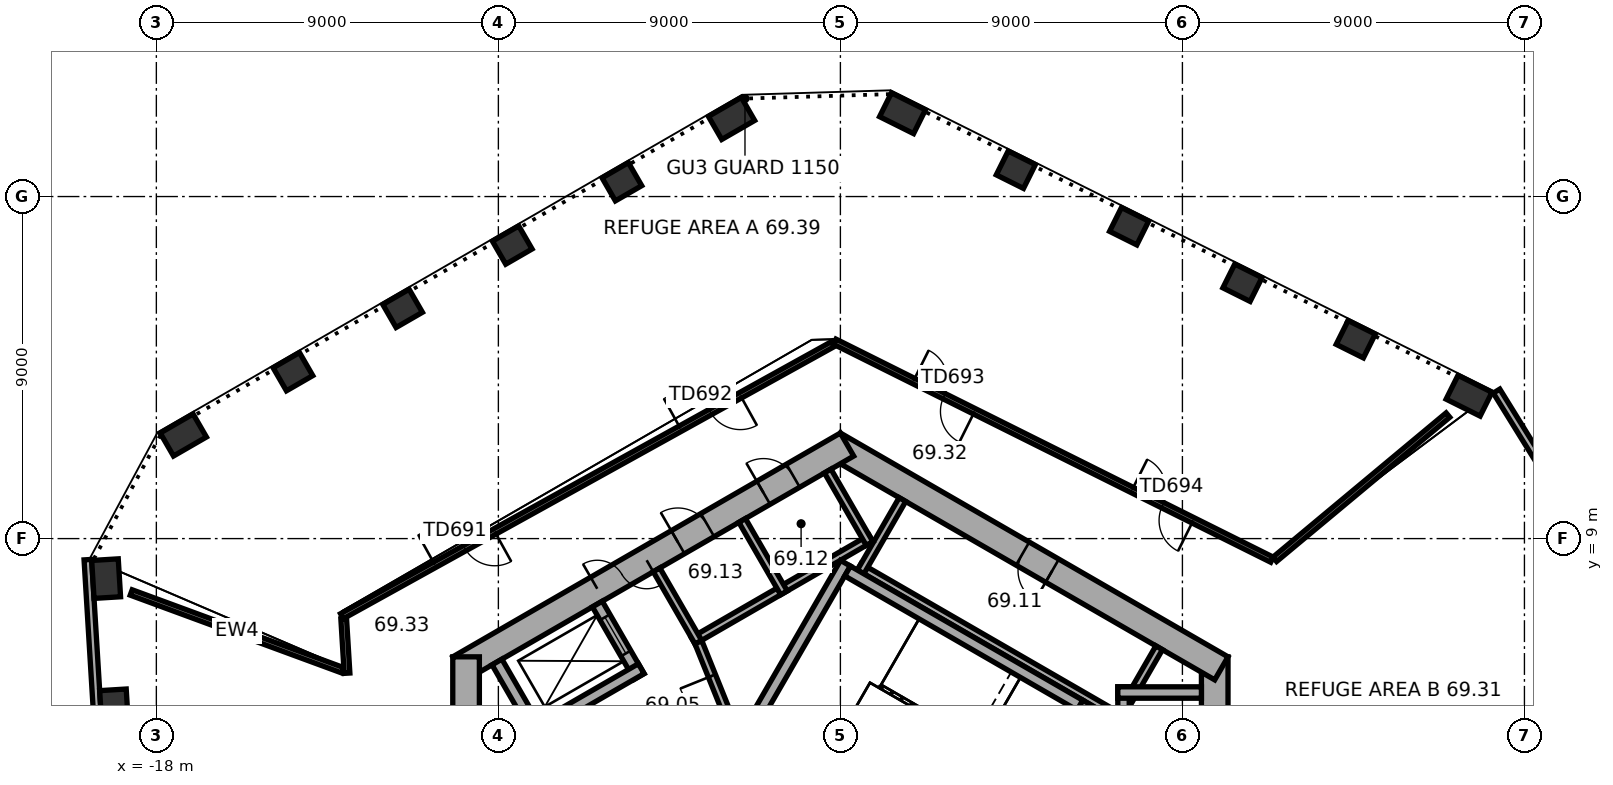
"""IFC4 building model, lengths in metres.
Left out: names, types, materials, properties, quantities, classifications, styles, units other than length and angle.
Written with IfcOpenShell. Run it as: python <this file> out.ifc"""

import sys

from ifc_helpers import new_model, si_unit, direction, frame, frame_2d, origin, origin_2d, place, context, subcontext, project, spatial, rectangle, extrude, element, fill, save


model = new_model("IFC4")
c1 = context("Model", 3, precision=1e-05, world=origin(), true_north=direction((0.0, 1.0)))
c2 = subcontext(c1, "Body", "Model", "MODEL_VIEW")
j1 = project(units=[si_unit("LENGTHUNIT", "METRE"), si_unit("PLANEANGLEUNIT", "RADIAN")], contexts=[c1])
p1 = place(None, origin())
s1 = spatial("IfcSite", under=j1, at=p1, CompositionType="ELEMENT")
p2 = place(p1, origin())
s2 = spatial("IfcBuilding", under=s1, at=p2, CompositionType="ELEMENT")
p3 = place(p2, frame((0.0, 0.0, 278.3)))
s3 = spatial("IfcBuildingStorey", under=s2, at=p3, CompositionType="ELEMENT", Elevation=278.3)
p4 = place(p3, frame((16.543, 12.759, 0.0), z_axis=(0.0, 0.0, 1.0), x_axis=(-0.894934361602, 0.44619781311, 0.0)))
e1 = element("IfcColumn", 1, at=p4, inside=s3, PredefinedType="COLUMN", context=c2, shape_type="SweptSolid", body=[
    extrude(rectangle(XDim=1.0, YDim=0.7, at=origin_2d()), origin(), (0.0, 0.0, 1.0), 7.4),
])
for number, where, z_axis, x_axis in (
    (2, (13.561, 14.246, 0.0), (0.0, 0.0, 1.0), (-0.895, 0.446, 0.0)),
    (3, (10.58, 15.732, 0.0), (0.0, 0.0, 1.0), (-0.895, 0.446, 0.0)),
    (4, (7.598, 17.219, 0.0), (0.0, 0.0, 1.0), (-0.895, 0.446, 0.0)),
    (5, (4.616, 18.706, 0.0), (0.0, 0.0, 1.0), (-0.895, 0.446, 0.0)),
):
    element("IfcColumn", number, at=place(p3, frame(where, z_axis=z_axis, x_axis=x_axis)), inside=s3, PredefinedType="COLUMN", context=c2, shape_type="SweptSolid", body=[
        extrude(rectangle(XDim=0.8, YDim=0.7, at=origin_2d()), origin(), (0.0, 0.0, 1.0), 7.4),
    ])
for number, where, z_axis, x_axis in (
    (6, (1.635, 20.192, 0.0), (0.0, 0.0, 1.0), (-0.895, 0.446, 0.0)),
    (7, (-2.864, 20.055, 0.0), (0.0, 0.0, 1.0), (-0.866, -0.5, 0.0)),
):
    element("IfcColumn", number, at=place(p3, frame(where, z_axis=z_axis, x_axis=x_axis)), inside=s3, PredefinedType="COLUMN", context=c2, shape_type="SweptSolid", body=[
        extrude(rectangle(XDim=1.0, YDim=0.7, at=origin_2d()), origin(), (0.0, 0.0, 1.0), 7.4),
    ])
for number, where, z_axis, x_axis in (
    (8, (-5.75, 18.389, 0.0), (0.0, 0.0, 1.0), (-0.866, -0.5, 0.0)),
    (9, (-8.635, 16.723, 0.0), (0.0, 0.0, 1.0), (-0.866, -0.5, 0.0)),
    (10, (-11.52, 15.057, 0.0), (0.0, 0.0, 1.0), (-0.866, -0.5, 0.0)),
    (11, (-14.406, 13.391, 0.0), (0.0, 0.0, 1.0), (-0.866, -0.5, 0.0)),
):
    element("IfcColumn", number, at=place(p3, frame(where, z_axis=z_axis, x_axis=x_axis)), inside=s3, PredefinedType="COLUMN", context=c2, shape_type="SweptSolid", body=[
        extrude(rectangle(XDim=0.8, YDim=0.7, at=origin_2d()), origin(), (0.0, 0.0, 1.0), 7.4),
    ])
for number, where, z_axis, x_axis in (
    (12, (-17.291, 11.726, 0.0), (0.0, 0.0, 1.0), (-0.866, -0.5, 0.0)),
    (13, (-19.321, 7.947, 0.0), (0.0, 0.0, 1.0), (0.061, -0.998, 0.0)),
):
    element("IfcColumn", number, at=place(p3, frame(where, z_axis=z_axis, x_axis=x_axis)), inside=s3, PredefinedType="COLUMN", context=c2, shape_type="SweptSolid", body=[
        extrude(rectangle(XDim=1.0, YDim=0.7, at=origin_2d()), origin(), (0.0, 0.0, 1.0), 7.4),
    ])
p5 = place(p3, frame((-19.118, 4.621, 0.0), z_axis=(0.0, 0.0, 1.0), x_axis=(0.061048539535, -0.998134798422, 0.0)))
e14 = element("IfcColumn", 14, at=p5, inside=s3, PredefinedType="COLUMN", context=c2, shape_type="SweptSolid", body=[
    extrude(rectangle(XDim=0.8, YDim=0.7, at=origin_2d()), origin(), (0.0, 0.0, 1.0), 7.4),
])
p6 = place(p3, frame((9.85, -5.889, 0.0), z_axis=(0.0, 0.0, 1.0), x_axis=(0.0, 1.0, 0.0)))
e15 = element("IfcWall", 15, at=p6, inside=s3, PredefinedType="SHEAR", context=c2, shape_type="SweptSolid", body=[
    extrude(rectangle(XDim=11.778, YDim=0.7, at=frame_2d((5.889, 0.0))), origin(), (0.0, 0.0, 1.0), 7.4),
])
p7 = place(p6, frame((6.089, 0.0, 0.0)))
e16 = element("IfcOpeningElement", 16, at=p7, cuts=e15, PredefinedType="OPENING", context=c2, shape_type="SweptSolid", body=[
    extrude(rectangle(XDim=1.5, YDim=2.1, at=frame_2d((0.75, 1.05))), frame((0.0, 0.36, 0.0), z_axis=(0.0, -1.0, 0.0), x_axis=(1.0, 0.0, 0.0)), (0.0, 0.0, 1.0), 0.72),
])
p8 = place(p6, frame((2.939, 0.0, 0.0)))
e17 = element("IfcOpeningElement", 17, at=p8, cuts=e15, PredefinedType="OPENING", context=c2, shape_type="SweptSolid", body=[
    extrude(rectangle(XDim=0.9, YDim=2.1, at=frame_2d((0.45, 1.05))), frame((0.0, 0.36, 0.0), z_axis=(0.0, -1.0, 0.0), x_axis=(1.0, 0.0, 0.0)), (0.0, 0.0, 1.0), 0.72),
])
p9 = place(p3, frame((10.025, 5.586, 0.0), z_axis=(0.0, 0.0, 1.0), x_axis=(-0.866026453023, 0.499998182661, 0.0)))
e18 = element("IfcWall", 18, at=p9, inside=s3, PredefinedType="SHEAR", context=c2, shape_type="SweptSolid", body=[
    extrude(rectangle(XDim=11.778, YDim=0.7, at=frame_2d((5.889, 0.0))), origin(), (0.0, 0.0, 1.0), 7.4),
])
p10 = place(p9, frame((5.139, 0.0, 0.0)))
e19 = element("IfcOpeningElement", 19, at=p10, cuts=e18, PredefinedType="OPENING", context=c2, shape_type="SweptSolid", body=[
    extrude(rectangle(XDim=0.9, YDim=2.1, at=frame_2d((0.45, 1.05))), frame((0.0, 0.36, 0.0), z_axis=(0.0, -1.0, 0.0), x_axis=(1.0, 0.0, 0.0)), (0.0, 0.0, 1.0), 0.72),
])
p11 = place(p3, frame((0.175, 11.475, 0.0), z_axis=(0.0, 0.0, 1.0), x_axis=(-0.866026453023, -0.499998182661, 0.0)))
e20 = element("IfcWall", 20, at=p11, inside=s3, PredefinedType="SHEAR", context=c2, shape_type="SweptSolid", body=[
    extrude(rectangle(XDim=11.778, YDim=0.7, at=frame_2d((5.889, 0.0))), origin(), (0.0, 0.0, 1.0), 7.4),
])
p12 = place(p11, frame((6.089, 0.0, 0.0)))
e21 = element("IfcOpeningElement", 21, at=p12, cuts=e20, PredefinedType="OPENING", context=c2, shape_type="SweptSolid", body=[
    extrude(rectangle(XDim=1.5, YDim=2.1, at=frame_2d((0.75, 1.05))), frame((0.0, 0.36, 0.0), z_axis=(0.0, -1.0, 0.0), x_axis=(1.0, 0.0, 0.0)), (0.0, 0.0, 1.0), 0.72),
])
p13 = place(p11, frame((1.639, 0.0, 0.0)))
e22 = element("IfcOpeningElement", 22, at=p13, cuts=e20, PredefinedType="OPENING", context=c2, shape_type="SweptSolid", body=[
    extrude(rectangle(XDim=0.9, YDim=2.1, at=frame_2d((0.45, 1.05))), frame((0.0, 0.36, 0.0), z_axis=(0.0, -1.0, 0.0), x_axis=(1.0, 0.0, 0.0)), (0.0, 0.0, 1.0), 0.72),
])
p14 = place(p11, frame((4.239, 0.0, 0.0)))
e23 = element("IfcOpeningElement", 23, at=p14, cuts=e20, PredefinedType="OPENING", context=c2, shape_type="SweptSolid", body=[
    extrude(rectangle(XDim=0.9, YDim=2.1, at=frame_2d((0.45, 1.05))), frame((0.0, 0.36, 0.0), z_axis=(0.0, -1.0, 0.0), x_axis=(1.0, 0.0, 0.0)), (0.0, 0.0, 1.0), 0.72),
])
p15 = place(p3, frame((-9.85, 5.889, 0.0), z_axis=(0.0, 0.0, 1.0), x_axis=(0.0, -1.0, 0.0)))
e24 = element("IfcWall", 24, at=p15, inside=s3, PredefinedType="SHEAR", context=c2, shape_type="SweptSolid", body=[
    extrude(rectangle(XDim=11.778, YDim=0.7, at=frame_2d((5.889, 0.0))), origin(), (0.0, 0.0, 1.0), 7.4),
])
p16 = place(p15, frame((5.039, 0.0, 0.0)))
e25 = element("IfcOpeningElement", 25, at=p16, cuts=e24, PredefinedType="OPENING", context=c2, shape_type="SweptSolid", body=[
    extrude(rectangle(XDim=1.1, YDim=2.1, at=frame_2d((0.55, 1.05))), frame((0.0, 0.36, 0.0), z_axis=(0.0, -1.0, 0.0), x_axis=(1.0, 0.0, 0.0)), (0.0, 0.0, 1.0), 0.72),
])
p17 = place(p15, frame((7.639, 0.0, 0.0)))
e26 = element("IfcOpeningElement", 26, at=p17, cuts=e24, PredefinedType="OPENING", context=c2, shape_type="SweptSolid", body=[
    extrude(rectangle(XDim=1.1, YDim=2.1, at=frame_2d((0.55, 1.05))), frame((0.0, 0.36, 0.0), z_axis=(0.0, -1.0, 0.0), x_axis=(1.0, 0.0, 0.0)), (0.0, 0.0, 1.0), 0.72),
])
p18 = place(p3, frame((19.235, 9.7, 0.0), z_axis=(0.0, 0.0, 1.0), x_axis=(-0.526204076801, 0.850358318333, 0.0)))
e27 = element("IfcWall", 27, at=p18, inside=s3, PredefinedType="STANDARD", context=c2, shape_type="SweptSolid", body=[
    extrude(rectangle(XDim=3.741, YDim=0.2, at=frame_2d((1.871, 0.0))), origin(), (0.0, 0.0, 1.0), 7.4),
])
p19 = place(p3, frame((-19.802, 8.446, 0.0), z_axis=(0.0, 0.0, 1.0), x_axis=(0.061036964236, -0.99813550633, 0.0)))
e28 = element("IfcWall", 28, at=p19, inside=s3, PredefinedType="STANDARD", context=c2, shape_type="SweptSolid", body=[
    extrude(rectangle(XDim=17.723, YDim=0.2, at=frame_2d((8.862, 0.0))), origin(), (0.0, 0.0, 1.0), 7.4),
])
p20 = place(p3, frame((-18.662, 7.582, 0.0), z_axis=(0.0, 0.0, 1.0), x_axis=(0.938501865144, -0.345274165152, 0.0)))
e29 = element("IfcWall", 29, at=p20, inside=s3, PredefinedType="STANDARD", context=c2, shape_type="SweptSolid", body=[
    extrude(rectangle(XDim=5.93, YDim=0.15, at=frame_2d((2.965, 0.0))), origin(), (0.0, 0.0, 1.0), 2.6),
])
p21 = place(p3, frame((-12.982, 5.458, 0.0), z_axis=(0.0, 0.0, 1.0), x_axis=(-0.06115150754, 0.998128495298, 0.0)))
e30 = element("IfcWall", 30, at=p21, inside=s3, PredefinedType="STANDARD", context=c2, shape_type="SweptSolid", body=[
    extrude(rectangle(XDim=1.437, YDim=0.15, at=frame_2d((0.719, 0.0))), origin(), (0.0, 0.0, 1.0), 2.6),
])
p22 = place(p3, frame((-13.117, 6.958, 0.0), z_axis=(0.0, 0.0, 1.0), x_axis=(0.874660896688, 0.484735304889, 0.0)))
e31 = element("IfcWall", 31, at=p22, inside=s3, PredefinedType="STANDARD", context=c2, shape_type="SweptSolid", body=[
    extrude(rectangle(XDim=14.781, YDim=0.15, at=frame_2d((7.39, 0.0))), origin(), (0.0, 0.0, 1.0), 2.6),
])
p23 = place(p22, frame((2.795, 0.0, 0.0)))
e32 = element("IfcOpeningElement", 32, at=p23, cuts=e31, PredefinedType="OPENING", context=c2, shape_type="SweptSolid", body=[
    extrude(rectangle(XDim=1.8, YDim=2.4, at=frame_2d((0.9, 1.2))), frame((0.0, 0.085, 0.0), z_axis=(0.0, -1.0, 0.0), x_axis=(1.0, 0.0, 0.0)), (0.0, 0.0, 1.0), 0.17),
])
p24 = place(p22, frame((10.186, 0.0, 0.0)))
e33 = element("IfcOpeningElement", 33, at=p24, cuts=e31, PredefinedType="OPENING", context=c2, shape_type="SweptSolid", body=[
    extrude(rectangle(XDim=1.8, YDim=2.4, at=frame_2d((0.9, 1.2))), frame((0.0, 0.085, 0.0), z_axis=(0.0, -1.0, 0.0), x_axis=(1.0, 0.0, 0.0)), (0.0, 0.0, 1.0), 0.17),
])
p25 = place(p3, frame((-0.149, 14.181, 0.0), z_axis=(0.0, 0.0, 1.0), x_axis=(0.894939310063, -0.446187887894, 0.0)))
e34 = element("IfcWall", 34, at=p25, inside=s3, PredefinedType="STANDARD", context=c2, shape_type="SweptSolid", body=[
    extrude(rectangle(XDim=12.857, YDim=0.15, at=frame_2d((6.428, 0.0))), origin(), (0.0, 0.0, 1.0), 2.6),
])
p26 = place(p25, frame((2.314, 0.0, 0.0)))
e35 = element("IfcOpeningElement", 35, at=p26, cuts=e34, PredefinedType="OPENING", context=c2, shape_type="SweptSolid", body=[
    extrude(rectangle(XDim=1.8, YDim=2.4, at=frame_2d((0.9, 1.2))), frame((0.0, 0.085, 0.0), z_axis=(0.0, -1.0, 0.0), x_axis=(1.0, 0.0, 0.0)), (0.0, 0.0, 1.0), 0.17),
])
p27 = place(p25, frame((8.743, 0.0, 0.0)))
e36 = element("IfcOpeningElement", 36, at=p27, cuts=e34, PredefinedType="OPENING", context=c2, shape_type="SweptSolid", body=[
    extrude(rectangle(XDim=1.8, YDim=2.4, at=frame_2d((0.9, 1.2))), frame((0.0, 0.085, 0.0), z_axis=(0.0, -1.0, 0.0), x_axis=(1.0, 0.0, 0.0)), (0.0, 0.0, 1.0), 0.17),
])
p28 = place(p3, frame((11.431, 8.454, 0.0), z_axis=(0.0, 0.0, 1.0), x_axis=(0.768295513577, 0.640095308386, 0.0)))
e37 = element("IfcWall", 37, at=p28, inside=s3, PredefinedType="STANDARD", context=c2, shape_type="SweptSolid", body=[
    extrude(rectangle(XDim=5.93, YDim=0.15, at=frame_2d((2.965, 0.0))), origin(), (0.0, 0.0, 1.0), 2.6),
])
p29 = place(p3, frame((7.424, 4.259, 0.0), z_axis=(0.0, 0.0, 1.0), x_axis=(-0.866026010844, 0.49999894854, 0.0)))
e38 = element("IfcWall", 38, at=p29, inside=s3, PredefinedType="PARTITIONING", context=c2, shape_type="SweptSolid", body=[
    extrude(rectangle(XDim=8.0, YDim=0.2, at=frame_2d((4.0, 0.0))), origin(), (0.0, 0.0, 1.0), 7.12),
])
for number, where, z_axis, x_axis in (
    (39, (7.287, 4.222, 0.0), (0.0, 0.0, 1.0), (0.5, 0.866, 0.0)),
    (40, (0.532, 8.122, 0.0), (0.0, 0.0, 1.0), (0.5, 0.866, 0.0)),
):
    element("IfcWall", number, at=place(p3, frame(where, z_axis=z_axis, x_axis=x_axis)), inside=s3, PredefinedType="PARTITIONING", context=c2, shape_type="SweptSolid", body=[
        extrude(rectangle(XDim=2.2, YDim=0.2, at=frame_2d((1.1, 0.0))), origin(), (0.0, 0.0, 1.0), 7.12),
    ])
p30 = place(p3, frame((0.803, 9.009, 0.0), z_axis=(0.0, 0.0, 1.0), x_axis=(-0.866028230842, -0.499995103361, 0.0)))
e41 = element("IfcWall", 41, at=p30, inside=s3, PredefinedType="PARTITIONING", context=c2, shape_type="SweptSolid", body=[
    extrude(rectangle(XDim=5.4, YDim=0.2, at=frame_2d((2.7, 0.0))), origin(), (0.0, 0.0, 1.0), 7.12),
])
p31 = place(p3, frame((0.767, 8.872, 0.0), z_axis=(0.0, 0.0, 1.0), x_axis=(-0.499994660107, 0.866028486751, 0.0)))
e42 = element("IfcWall", 42, at=p31, inside=s3, PredefinedType="PARTITIONING", context=c2, shape_type="SweptSolid", body=[
    extrude(rectangle(XDim=2.2, YDim=0.2, at=frame_2d((1.1, 0.0))), origin(), (0.0, 0.0, 1.0), 7.12),
])
for number, where, z_axis, x_axis in (
    (43, (-1.485, 7.572, 0.0), (0.0, 0.0, 1.0), (-0.5, 0.866, 0.0)),
    (44, (-3.737, 6.272, 0.0), (0.0, 0.0, 1.0), (-0.5, 0.866, 0.0)),
):
    element("IfcWall", number, at=place(p3, frame(where, z_axis=z_axis, x_axis=x_axis)), inside=s3, PredefinedType="PARTITIONING", context=c2, shape_type="SweptSolid", body=[
        extrude(rectangle(XDim=2.2, YDim=0.2, at=frame_2d((1.1, 0.0))), origin(), (0.0, 0.0, 1.0), 7.12),
    ])
p32 = place(p3, frame((4.158, 0.602, 0.0), z_axis=(0.0, 0.0, 1.0), x_axis=(0.499977259774, 0.866038532462, 0.0)))
e45 = element("IfcWall", 45, at=p32, inside=s3, PredefinedType="SHEAR", context=c2, shape_type="SweptSolid", body=[
    extrude(rectangle(XDim=4.7, YDim=0.3, at=frame_2d((2.35, 0.0))), origin(), (0.0, 0.0, 1.0), 7.12),
])
p33 = place(p32, frame((0.8, 0.0, 0.0)))
e46 = element("IfcOpeningElement", 46, at=p33, cuts=e45, PredefinedType="OPENING", context=c2, shape_type="SweptSolid", body=[
    extrude(rectangle(XDim=1.2, YDim=2.1, at=frame_2d((0.6, 1.05))), frame((0.0, 0.16, 0.0), z_axis=(0.0, -1.0, 0.0), x_axis=(1.0, 0.0, 0.0)), (0.0, 0.0, 1.0), 0.32),
])
p34 = place(p3, frame((-2.216, 4.282, 0.0), z_axis=(0.0, 0.0, 1.0), x_axis=(0.499977259774, 0.866038532462, 0.0)))
e47 = element("IfcWall", 47, at=p34, inside=s3, PredefinedType="SHEAR", context=c2, shape_type="SweptSolid", body=[
    extrude(rectangle(XDim=4.7, YDim=0.3, at=frame_2d((2.35, 0.0))), origin(), (0.0, 0.0, 1.0), 7.12),
])
p35 = place(p3, frame((6.303, 4.617, 0.0), z_axis=(0.0, 0.0, 1.0), x_axis=(-0.866027801685, 0.499995846692, 0.0)))
e48 = element("IfcWall", 48, at=p35, inside=s3, PredefinedType="SHEAR", context=c2, shape_type="SweptSolid", body=[
    extrude(rectangle(XDim=7.06, YDim=0.3, at=frame_2d((3.53, 0.0))), origin(), (0.0, 0.0, 1.0), 7.12),
])
p36 = place(p3, frame((7.45, 1.75, 0.0), z_axis=(0.0, 0.0, 1.0), x_axis=(0.0, 1.0, 0.0)))
e49 = element("IfcWall", 49, at=p36, inside=s3, PredefinedType="SHEAR", context=c2, shape_type="SweptSolid", body=[
    extrude(rectangle(XDim=3.35, YDim=0.3, at=frame_2d((1.675, 0.0))), origin(), (0.0, 0.0, 1.0), 7.12),
])
p37 = place(p3, frame((7.3, 4.95, 0.0), z_axis=(0.0, 0.0, 1.0), x_axis=(1.0, 0.0, 0.0)))
e50 = element("IfcWall", 50, at=p37, inside=s3, PredefinedType="SHEAR", context=c2, shape_type="SweptSolid", body=[
    extrude(rectangle(XDim=2.2, YDim=0.3, at=frame_2d((1.1, 0.0))), origin(), (0.0, 0.0, 1.0), 7.12),
])
p38 = place(p3, frame((-5.295, 5.372, 0.0), z_axis=(0.0, 0.0, 1.0), x_axis=(-0.500077893725, 0.86598042715, 0.0)))
e51 = element("IfcWall", 51, at=p38, inside=s3, PredefinedType="SHEAR", context=c2, shape_type="SweptSolid", body=[
    extrude(rectangle(XDim=2.2, YDim=0.3, at=frame_2d((1.1, 0.0))), origin(), (0.0, 0.0, 1.0), 7.12),
])
p39 = place(p38, frame((0.7, 0.0, 0.0)))
e52 = element("IfcOpeningElement", 52, at=p39, cuts=e51, PredefinedType="OPENING", context=c2, shape_type="SweptSolid", body=[
    extrude(rectangle(XDim=1.1, YDim=2.1, at=frame_2d((0.55, 1.05))), frame((0.0, 0.16, 0.0), z_axis=(0.0, -1.0, 0.0), x_axis=(1.0, 0.0, 0.0)), (0.0, 0.0, 1.0), 0.32),
])
p40 = place(p3, frame((-5.24, 5.577, 0.0), z_axis=(0.0, 0.0, 1.0), x_axis=(-0.866014461049, -0.500018952895, 0.0)))
e53 = element("IfcWall", 53, at=p40, inside=s3, PredefinedType="SHEAR", context=c2, shape_type="SweptSolid", body=[
    extrude(rectangle(XDim=3.35, YDim=0.3, at=frame_2d((1.675, 0.0))), origin(), (0.0, 0.0, 1.0), 7.12),
])
p41 = place(p3, frame((-7.937, 3.847, 0.0), z_axis=(0.0, 0.0, 1.0), x_axis=(-0.50002983664, 0.866008176907, 0.0)))
e54 = element("IfcWall", 54, at=p41, inside=s3, PredefinedType="SHEAR", context=c2, shape_type="SweptSolid", body=[
    extrude(rectangle(XDim=2.2, YDim=0.3, at=frame_2d((1.1, 0.0))), origin(), (0.0, 0.0, 1.0), 7.12),
])
p42 = place(p3, frame((-2.615, 3.487, 0.0), z_axis=(0.0, 0.0, 1.0), x_axis=(-0.373576831041, 0.92759924068, 0.0)))
e55 = element("IfcWall", 55, at=p42, inside=s3, PredefinedType="PARTITIONING", context=c2, shape_type="SweptSolid", body=[
    extrude(rectangle(XDim=3.002, YDim=0.2, at=frame_2d((1.501, 0.0))), origin(), (0.0, 0.0, 1.0), 7.12),
])
p43 = place(p42, frame((1.15, 0.0, 0.0)))
e56 = element("IfcOpeningElement", 56, at=p43, cuts=e55, PredefinedType="OPENING", context=c2, shape_type="SweptSolid", body=[
    extrude(rectangle(XDim=0.9, YDim=2.1, at=frame_2d((0.45, 1.05))), frame((0.0, 0.11, 0.0), z_axis=(0.0, -1.0, 0.0), x_axis=(1.0, 0.0, 0.0)), (0.0, 0.0, 1.0), 0.22),
])
p44 = place(p23, origin())
e57 = element("IfcDoor", 57, at=p44, inside=s3, OperationType="DOUBLE_DOOR_DOUBLE_SWING", PredefinedType="DOOR", context=c2, shape_type="SweptSolid", body=[
    extrude(rectangle(XDim=1.8, YDim=2.4, at=frame_2d((0.9, 1.2))), frame((0.0, 0.025, 0.0), z_axis=(0.0, -1.0, 0.0), x_axis=(1.0, 0.0, 0.0)), (0.0, 0.0, 1.0), 0.05),
])
fill(e32, e57)
p45 = place(p24, origin())
e58 = element("IfcDoor", 58, at=p45, inside=s3, OperationType="DOUBLE_DOOR_DOUBLE_SWING", PredefinedType="DOOR", context=c2, shape_type="SweptSolid", body=[
    extrude(rectangle(XDim=1.8, YDim=2.4, at=frame_2d((0.9, 1.2))), frame((0.0, 0.025, 0.0), z_axis=(0.0, -1.0, 0.0), x_axis=(1.0, 0.0, 0.0)), (0.0, 0.0, 1.0), 0.05),
])
fill(e33, e58)
p46 = place(p26, origin())
e59 = element("IfcDoor", 59, at=p46, inside=s3, OperationType="DOUBLE_DOOR_DOUBLE_SWING", PredefinedType="DOOR", context=c2, shape_type="SweptSolid", body=[
    extrude(rectangle(XDim=1.8, YDim=2.4, at=frame_2d((0.9, 1.2))), frame((0.0, 0.025, 0.0), z_axis=(0.0, -1.0, 0.0), x_axis=(1.0, 0.0, 0.0)), (0.0, 0.0, 1.0), 0.05),
])
fill(e35, e59)
p47 = place(p27, origin())
e60 = element("IfcDoor", 60, at=p47, inside=s3, OperationType="DOUBLE_DOOR_DOUBLE_SWING", PredefinedType="DOOR", context=c2, shape_type="SweptSolid", body=[
    extrude(rectangle(XDim=1.8, YDim=2.4, at=frame_2d((0.9, 1.2))), frame((0.0, 0.025, 0.0), z_axis=(0.0, -1.0, 0.0), x_axis=(1.0, 0.0, 0.0)), (0.0, 0.0, 1.0), 0.05),
])
fill(e36, e60)
p48 = place(p12, origin())
e61 = element("IfcDoor", 61, at=p48, inside=s3, OperationType="DOUBLE_DOOR_SINGLE_SWING", PredefinedType="DOOR", context=c2, shape_type="SweptSolid", body=[
    extrude(rectangle(XDim=1.5, YDim=2.1, at=frame_2d((0.75, 1.05))), frame((0.0, 0.025, 0.0), z_axis=(0.0, -1.0, 0.0), x_axis=(1.0, 0.0, 0.0)), (0.0, 0.0, 1.0), 0.05),
])
fill(e21, e61)
p49 = place(p43, origin())
e62 = element("IfcDoor", 62, at=p49, inside=s3, OperationType="SINGLE_SWING_LEFT", PredefinedType="DOOR", context=c2, shape_type="SweptSolid", body=[
    extrude(rectangle(XDim=0.9, YDim=2.1, at=frame_2d((0.45, 1.05))), frame((0.0, 0.025, 0.0), z_axis=(0.0, -1.0, 0.0), x_axis=(1.0, 0.0, 0.0)), (0.0, 0.0, 1.0), 0.05),
])
fill(e56, e62)
p50 = place(p10, origin())
e63 = element("IfcDoor", 63, at=p50, inside=s3, OperationType="SINGLE_SWING_LEFT", PredefinedType="DOOR", context=c2, shape_type="SweptSolid", body=[
    extrude(rectangle(XDim=0.9, YDim=2.1, at=frame_2d((0.45, 1.05))), frame((0.0, 0.025, 0.0), z_axis=(0.0, -1.0, 0.0), x_axis=(1.0, 0.0, 0.0)), (0.0, 0.0, 1.0), 0.05),
])
fill(e19, e63)
p51 = place(p13, origin())
e64 = element("IfcDoor", 64, at=p51, inside=s3, OperationType="SINGLE_SWING_LEFT", PredefinedType="DOOR", context=c2, shape_type="SweptSolid", body=[
    extrude(rectangle(XDim=0.9, YDim=2.1, at=frame_2d((0.45, 1.05))), frame((0.0, 0.025, 0.0), z_axis=(0.0, -1.0, 0.0), x_axis=(1.0, 0.0, 0.0)), (0.0, 0.0, 1.0), 0.05),
])
fill(e22, e64)
p52 = place(p14, origin())
e65 = element("IfcDoor", 65, at=p52, inside=s3, OperationType="SINGLE_SWING_LEFT", PredefinedType="DOOR", context=c2, shape_type="SweptSolid", body=[
    extrude(rectangle(XDim=0.9, YDim=2.1, at=frame_2d((0.45, 1.05))), frame((0.0, 0.025, 0.0), z_axis=(0.0, -1.0, 0.0), x_axis=(1.0, 0.0, 0.0)), (0.0, 0.0, 1.0), 0.05),
])
fill(e23, e65)
p53 = place(p39, origin())
e66 = element("IfcDoor", 66, at=p53, inside=s3, OperationType="DOUBLE_DOOR_SLIDING", PredefinedType="DOOR", context=c2, shape_type="SweptSolid", body=[
    extrude(rectangle(XDim=1.1, YDim=2.1, at=frame_2d((0.55, 1.05))), frame((0.0, 0.025, 0.0), z_axis=(0.0, -1.0, 0.0), x_axis=(1.0, 0.0, 0.0)), (0.0, 0.0, 1.0), 0.05),
])
fill(e52, e66)
save(model, sys.argv[1])
